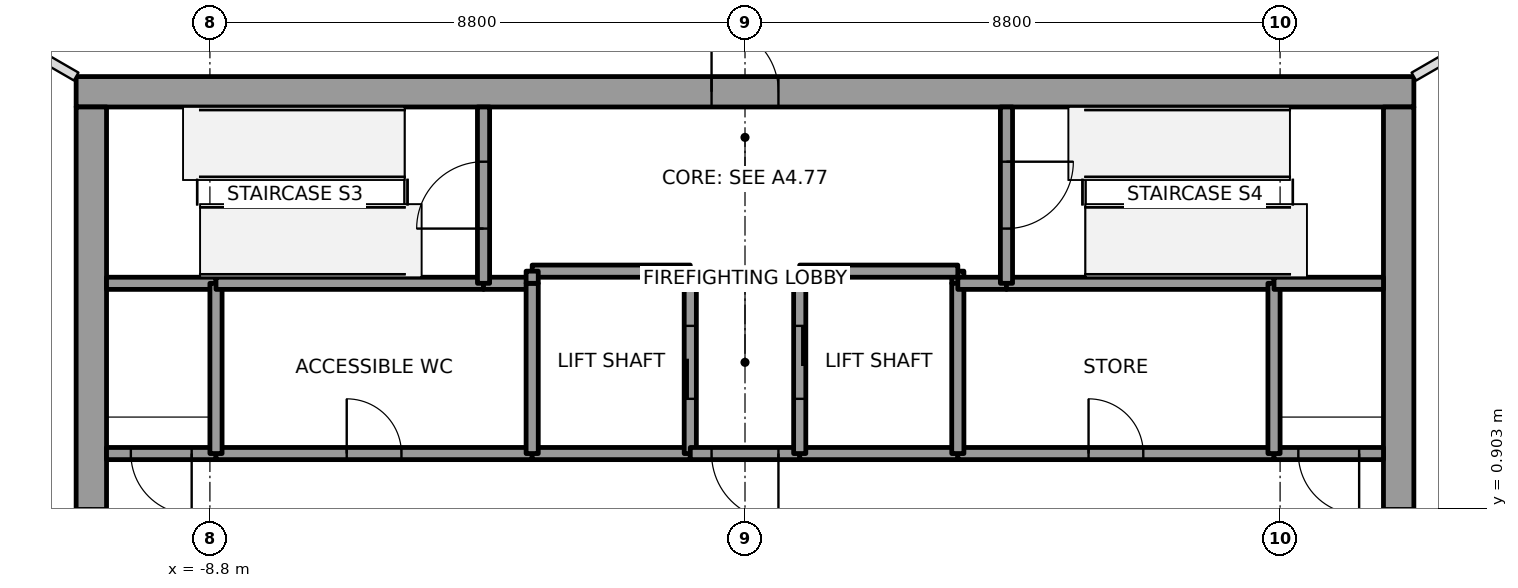
"""IFC4 building model, lengths in metres.
Left out: names, types, materials, properties, quantities, classifications, styles, units other than length and angle.
Written with IfcOpenShell. Run it as: python <this file> out.ifc"""

import sys

from ifc_helpers import new_model, si_unit, direction, frame, frame_2d, origin, place, context, subcontext, project, spatial, rectangle, extrude, element, fill, save


model = new_model("IFC4")
c1 = context("Model", 3, precision=1e-05, world=origin(), true_north=direction((0.0, 1.0)))
c2 = subcontext(c1, "Body", "Model", "MODEL_VIEW")
j1 = project(units=[si_unit("LENGTHUNIT", "METRE"), si_unit("PLANEANGLEUNIT", "RADIAN")], contexts=[c1])
p1 = place(None, origin())
s1 = spatial("IfcSite", under=j1, at=p1, CompositionType="ELEMENT")
p2 = place(p1, origin())
s2 = spatial("IfcBuilding", under=s1, at=p2, CompositionType="ELEMENT")
p3 = place(p2, frame((0.0, 0.0, 330.4)))
s3 = spatial("IfcBuildingStorey", under=s2, at=p3, CompositionType="ELEMENT", Elevation=330.4)
p4 = place(p3, frame((-11.0, 7.75, 0.0), z_axis=(0.0, 0.0, 1.0), x_axis=(1.0, 0.0, 0.0)))
e1 = element("IfcWall", 1, at=p4, inside=s3, PredefinedType="SHEAR", context=c2, shape_type="SweptSolid", body=[
    extrude(rectangle(XDim=22.0, YDim=0.5, at=frame_2d((11.0, 0.0))), origin(), (0.0, 0.0, 1.0), 9.0),
])
p5 = place(p4, frame((10.45, 0.0, 0.0)))
e2 = element("IfcOpeningElement", 2, at=p5, cuts=e1, PredefinedType="OPENING", context=c2, shape_type="SweptSolid", body=[
    extrude(rectangle(XDim=1.1, YDim=2.1, at=frame_2d((0.55, 1.05))), frame((0.0, 0.25, 0.0), z_axis=(0.0, -1.0, 0.0), x_axis=(1.0, 0.0, 0.0)), (0.0, 0.0, 1.0), 0.5),
])
p6 = place(p3, frame((-10.75, -7.5, 0.0), z_axis=(0.0, 0.0, 1.0), x_axis=(0.0, 1.0, 0.0)))
e3 = element("IfcWall", 3, at=p6, inside=s3, PredefinedType="SHEAR", context=c2, shape_type="SweptSolid", body=[
    extrude(rectangle(XDim=15.0, YDim=0.5, at=frame_2d((7.5, 0.0))), origin(), (0.0, 0.0, 1.0), 9.0),
])
p7 = place(p6, frame((6.6, 0.0, 0.0)))
e4 = element("IfcOpeningElement", 4, at=p7, cuts=e3, PredefinedType="OPENING", context=c2, shape_type="SweptSolid", body=[
    extrude(rectangle(XDim=1.8, YDim=2.1, at=frame_2d((0.9, 1.05))), frame((0.0, 0.25, 0.0), z_axis=(0.0, -1.0, 0.0), x_axis=(1.0, 0.0, 0.0)), (0.0, 0.0, 1.0), 0.5),
])
p8 = place(p3, frame((10.75, -7.5, 0.0), z_axis=(0.0, 0.0, 1.0), x_axis=(0.0, 1.0, 0.0)))
e5 = element("IfcWall", 5, at=p8, inside=s3, PredefinedType="SHEAR", context=c2, shape_type="SweptSolid", body=[
    extrude(rectangle(XDim=15.0, YDim=0.5, at=frame_2d((7.5, 0.0))), origin(), (0.0, 0.0, 1.0), 9.0),
])
p9 = place(p8, frame((6.6, 0.0, 0.0)))
e6 = element("IfcOpeningElement", 6, at=p9, cuts=e5, PredefinedType="OPENING", context=c2, shape_type="SweptSolid", body=[
    extrude(rectangle(XDim=1.8, YDim=2.1, at=frame_2d((0.9, 1.05))), frame((0.0, 0.25, 0.0), z_axis=(0.0, -1.0, 0.0), x_axis=(1.0, 0.0, 0.0)), (0.0, 0.0, 1.0), 0.5),
])
p10 = place(p3, frame((-8.7, 1.8, 0.0), z_axis=(0.0, 0.0, 1.0), x_axis=(-1.0, 0.0, 0.0)))
e7 = element("IfcWall", 7, at=p10, inside=s3, PredefinedType="SOLIDWALL", context=c2, shape_type="SweptSolid", body=[
    extrude(rectangle(XDim=1.8, YDim=0.2, at=frame_2d((0.9, 0.0))), origin(), (0.0, 0.0, 1.0), 8.85),
])
p11 = place(p10, frame((0.4, 0.0, 0.0)))
e8 = element("IfcOpeningElement", 8, at=p11, cuts=e7, PredefinedType="OPENING", context=c2, shape_type="SweptSolid", body=[
    extrude(rectangle(XDim=1.0, YDim=2.1, at=frame_2d((0.5, 1.05))), frame((0.0, 0.1, 0.0), z_axis=(0.0, -1.0, 0.0), x_axis=(1.0, 0.0, 0.0)), (0.0, 0.0, 1.0), 0.2),
])
p12 = place(p3, frame((-8.7, 4.6, 0.0), z_axis=(0.0, 0.0, 1.0), x_axis=(-1.0, 0.0, 0.0)))
e9 = element("IfcWall", 9, at=p12, inside=s3, PredefinedType="SOLIDWALL", context=c2, shape_type="SweptSolid", body=[
    extrude(rectangle(XDim=1.8, YDim=0.2, at=frame_2d((0.9, 0.0))), origin(), (0.0, 0.0, 1.0), 8.85),
])
p13 = place(p3, frame((-8.7, 1.8, 0.0), z_axis=(0.0, 0.0, 1.0), x_axis=(1.0, 0.0, 0.0)))
e10 = element("IfcWall", 10, at=p13, inside=s3, PredefinedType="SOLIDWALL", context=c2, shape_type="SweptSolid", body=[
    extrude(rectangle(XDim=5.2, YDim=0.2, at=frame_2d((2.6, 0.0))), origin(), (0.0, 0.0, 1.0), 8.85),
])
p14 = place(p13, frame((2.15, 0.0, 0.0)))
e11 = element("IfcOpeningElement", 11, at=p14, cuts=e10, PredefinedType="OPENING", context=c2, shape_type="SweptSolid", body=[
    extrude(rectangle(XDim=0.9, YDim=2.1, at=frame_2d((0.45, 1.05))), frame((0.0, 0.1, 0.0), z_axis=(0.0, -1.0, 0.0), x_axis=(1.0, 0.0, 0.0)), (0.0, 0.0, 1.0), 0.2),
])
p15 = place(p3, frame((-8.7, 4.6, 0.0), z_axis=(0.0, 0.0, 1.0), x_axis=(0.0, -1.0, 0.0)))
e12 = element("IfcWall", 12, at=p15, inside=s3, PredefinedType="SOLIDWALL", context=c2, shape_type="SweptSolid", body=[
    extrude(rectangle(XDim=2.8, YDim=0.2, at=frame_2d((1.4, 0.0))), origin(), (0.0, 0.0, 1.0), 8.85),
])
p16 = place(p3, frame((-4.3, 4.6, 0.0), z_axis=(0.0, 0.0, 1.0), x_axis=(-1.0, 0.0, 0.0)))
e13 = element("IfcWall", 13, at=p16, inside=s3, PredefinedType="SOLIDWALL", context=c2, shape_type="SweptSolid", body=[
    extrude(rectangle(XDim=4.4, YDim=0.2, at=frame_2d((2.2, 0.0))), origin(), (0.0, 0.0, 1.0), 8.85),
])
p17 = place(p3, frame((-3.5, 4.6, 0.0), z_axis=(0.0, 0.0, 1.0), x_axis=(-1.0, 0.0, 0.0)))
e14 = element("IfcWall", 14, at=p17, inside=s3, PredefinedType="SOLIDWALL", context=c2, shape_type="SweptSolid", body=[
    extrude(rectangle(XDim=0.8, YDim=0.2, at=frame_2d((0.4, 0.0))), origin(), (0.0, 0.0, 1.0), 8.85),
])
p18 = place(p3, frame((-4.3, 4.6, 0.0), z_axis=(0.0, 0.0, 1.0), x_axis=(0.0, 1.0, 0.0)))
e15 = element("IfcWall", 15, at=p18, inside=s3, PredefinedType="SOLIDWALL", context=c2, shape_type="SweptSolid", body=[
    extrude(rectangle(XDim=2.9, YDim=0.2, at=frame_2d((1.45, 0.0))), origin(), (0.0, 0.0, 1.0), 8.85),
])
p19 = place(p18, frame((0.9, 0.0, 0.0)))
e16 = element("IfcOpeningElement", 16, at=p19, cuts=e15, PredefinedType="OPENING", context=c2, shape_type="SweptSolid", body=[
    extrude(rectangle(XDim=1.1, YDim=2.1, at=frame_2d((0.55, 1.05))), frame((0.0, 0.1, 0.0), z_axis=(0.0, -1.0, 0.0), x_axis=(1.0, 0.0, 0.0)), (0.0, 0.0, 1.0), 0.2),
])
p20 = place(p3, frame((-0.9, 1.8, 0.0), z_axis=(0.0, 0.0, 1.0), x_axis=(-1.0, 0.0, 0.0)))
e17 = element("IfcWall", 17, at=p20, inside=s3, PredefinedType="SOLIDWALL", context=c2, shape_type="SweptSolid", body=[
    extrude(rectangle(XDim=2.6, YDim=0.2, at=frame_2d((1.3, 0.0))), origin(), (0.0, 0.0, 1.0), 8.85),
])
p21 = place(p3, frame((-3.5, 1.8, 0.0), z_axis=(0.0, 0.0, 1.0), x_axis=(0.0, 1.0, 0.0)))
e18 = element("IfcWall", 18, at=p21, inside=s3, PredefinedType="SOLIDWALL", context=c2, shape_type="SweptSolid", body=[
    extrude(rectangle(XDim=2.8, YDim=0.2, at=frame_2d((1.4, 0.0))), origin(), (0.0, 0.0, 1.0), 8.85),
])
p22 = place(p3, frame((-0.9, 1.8, 0.0), z_axis=(0.0, 0.0, 1.0), x_axis=(0.0, 1.0, 0.0)))
e19 = element("IfcWall", 19, at=p22, inside=s3, PredefinedType="SOLIDWALL", context=c2, shape_type="SweptSolid", body=[
    extrude(rectangle(XDim=3.0, YDim=0.2, at=frame_2d((1.5, 0.0))), origin(), (0.0, 0.0, 1.0), 8.85),
])
p23 = place(p22, frame((0.9, 0.0, 0.0)))
e20 = element("IfcOpeningElement", 20, at=p23, cuts=e19, PredefinedType="OPENING", context=c2, shape_type="SweptSolid", body=[
    extrude(rectangle(XDim=1.2, YDim=2.1, at=frame_2d((0.6, 1.05))), frame((0.0, 0.1, 0.0), z_axis=(0.0, -1.0, 0.0), x_axis=(1.0, 0.0, 0.0)), (0.0, 0.0, 1.0), 0.2),
])
p24 = place(p3, frame((-0.9, 4.8, 0.0), z_axis=(0.0, 0.0, 1.0), x_axis=(-1.0, 0.0, 0.0)))
e21 = element("IfcWall", 21, at=p24, inside=s3, PredefinedType="SOLIDWALL", context=c2, shape_type="SweptSolid", body=[
    extrude(rectangle(XDim=2.6, YDim=0.2, at=frame_2d((1.3, 0.0))), origin(), (0.0, 0.0, 1.0), 8.85),
])
p25 = place(p3, frame((-3.5, 4.8, 0.0), z_axis=(0.0, 0.0, 1.0), x_axis=(0.0, -1.0, 0.0)))
e22 = element("IfcWall", 22, at=p25, inside=s3, PredefinedType="SOLIDWALL", context=c2, shape_type="SweptSolid", body=[
    extrude(rectangle(XDim=0.2, YDim=0.2, at=frame_2d((0.1, 0.0))), origin(), (0.0, 0.0, 1.0), 8.85),
])
p26 = place(p3, frame((0.9, 1.8, 0.0), z_axis=(0.0, 0.0, 1.0), x_axis=(-1.0, 0.0, 0.0)))
e23 = element("IfcWall", 23, at=p26, inside=s3, PredefinedType="SOLIDWALL", context=c2, shape_type="SweptSolid", body=[
    extrude(rectangle(XDim=1.8, YDim=0.2, at=frame_2d((0.9, 0.0))), origin(), (0.0, 0.0, 1.0), 8.85),
])
p27 = place(p26, frame((0.35, 0.0, 0.0)))
e24 = element("IfcOpeningElement", 24, at=p27, cuts=e23, PredefinedType="OPENING", context=c2, shape_type="SweptSolid", body=[
    extrude(rectangle(XDim=1.1, YDim=2.1, at=frame_2d((0.55, 1.05))), frame((0.0, 0.1, 0.0), z_axis=(0.0, -1.0, 0.0), x_axis=(1.0, 0.0, 0.0)), (0.0, 0.0, 1.0), 0.2),
])
p28 = place(p3, frame((3.5, 1.8, 0.0), z_axis=(0.0, 0.0, 1.0), x_axis=(-1.0, 0.0, 0.0)))
e25 = element("IfcWall", 25, at=p28, inside=s3, PredefinedType="SOLIDWALL", context=c2, shape_type="SweptSolid", body=[
    extrude(rectangle(XDim=2.6, YDim=0.2, at=frame_2d((1.3, 0.0))), origin(), (0.0, 0.0, 1.0), 8.85),
])
p29 = place(p3, frame((3.5, 4.6, 0.0), z_axis=(0.0, 0.0, 1.0), x_axis=(0.0, 1.0, 0.0)))
e26 = element("IfcWall", 26, at=p29, inside=s3, PredefinedType="SOLIDWALL", context=c2, shape_type="SweptSolid", body=[
    extrude(rectangle(XDim=0.2, YDim=0.2, at=frame_2d((0.1, 0.0))), origin(), (0.0, 0.0, 1.0), 8.85),
])
p30 = place(p3, frame((3.5, 4.8, 0.0), z_axis=(0.0, 0.0, 1.0), x_axis=(-1.0, 0.0, 0.0)))
e27 = element("IfcWall", 27, at=p30, inside=s3, PredefinedType="SOLIDWALL", context=c2, shape_type="SweptSolid", body=[
    extrude(rectangle(XDim=2.6, YDim=0.2, at=frame_2d((1.3, 0.0))), origin(), (0.0, 0.0, 1.0), 8.85),
])
p31 = place(p3, frame((0.9, 4.8, 0.0), z_axis=(0.0, 0.0, 1.0), x_axis=(0.0, -1.0, 0.0)))
e28 = element("IfcWall", 28, at=p31, inside=s3, PredefinedType="SOLIDWALL", context=c2, shape_type="SweptSolid", body=[
    extrude(rectangle(XDim=3.0, YDim=0.2, at=frame_2d((1.5, 0.0))), origin(), (0.0, 0.0, 1.0), 8.85),
])
p32 = place(p31, frame((0.9, 0.0, 0.0)))
e29 = element("IfcOpeningElement", 29, at=p32, cuts=e28, PredefinedType="OPENING", context=c2, shape_type="SweptSolid", body=[
    extrude(rectangle(XDim=1.2, YDim=2.1, at=frame_2d((0.6, 1.05))), frame((0.0, 0.1, 0.0), z_axis=(0.0, -1.0, 0.0), x_axis=(1.0, 0.0, 0.0)), (0.0, 0.0, 1.0), 0.2),
])
p33 = place(p3, frame((3.5, 1.8, 0.0), z_axis=(0.0, 0.0, 1.0), x_axis=(1.0, 0.0, 0.0)))
e30 = element("IfcWall", 30, at=p33, inside=s3, PredefinedType="SOLIDWALL", context=c2, shape_type="SweptSolid", body=[
    extrude(rectangle(XDim=5.2, YDim=0.2, at=frame_2d((2.6, 0.0))), origin(), (0.0, 0.0, 1.0), 8.85),
])
p34 = place(p33, frame((2.15, 0.0, 0.0)))
e31 = element("IfcOpeningElement", 31, at=p34, cuts=e30, PredefinedType="OPENING", context=c2, shape_type="SweptSolid", body=[
    extrude(rectangle(XDim=0.9, YDim=2.1, at=frame_2d((0.45, 1.05))), frame((0.0, 0.1, 0.0), z_axis=(0.0, -1.0, 0.0), x_axis=(1.0, 0.0, 0.0)), (0.0, 0.0, 1.0), 0.2),
])
p35 = place(p3, frame((3.5, 4.6, 0.0), z_axis=(0.0, 0.0, 1.0), x_axis=(0.0, -1.0, 0.0)))
e32 = element("IfcWall", 32, at=p35, inside=s3, PredefinedType="SOLIDWALL", context=c2, shape_type="SweptSolid", body=[
    extrude(rectangle(XDim=2.8, YDim=0.2, at=frame_2d((1.4, 0.0))), origin(), (0.0, 0.0, 1.0), 8.85),
])
p36 = place(p3, frame((4.3, 4.6, 0.0), z_axis=(0.0, 0.0, 1.0), x_axis=(-1.0, 0.0, 0.0)))
e33 = element("IfcWall", 33, at=p36, inside=s3, PredefinedType="SOLIDWALL", context=c2, shape_type="SweptSolid", body=[
    extrude(rectangle(XDim=0.8, YDim=0.2, at=frame_2d((0.4, 0.0))), origin(), (0.0, 0.0, 1.0), 8.85),
])
p37 = place(p3, frame((8.7, 4.6, 0.0), z_axis=(0.0, 0.0, 1.0), x_axis=(-1.0, 0.0, 0.0)))
e34 = element("IfcWall", 34, at=p37, inside=s3, PredefinedType="SOLIDWALL", context=c2, shape_type="SweptSolid", body=[
    extrude(rectangle(XDim=4.4, YDim=0.2, at=frame_2d((2.2, 0.0))), origin(), (0.0, 0.0, 1.0), 8.85),
])
p38 = place(p3, frame((4.3, 7.5, 0.0), z_axis=(0.0, 0.0, 1.0), x_axis=(0.0, -1.0, 0.0)))
e35 = element("IfcWall", 35, at=p38, inside=s3, PredefinedType="SOLIDWALL", context=c2, shape_type="SweptSolid", body=[
    extrude(rectangle(XDim=2.9, YDim=0.2, at=frame_2d((1.45, 0.0))), origin(), (0.0, 0.0, 1.0), 8.85),
])
p39 = place(p38, frame((0.9, 0.0, 0.0)))
e36 = element("IfcOpeningElement", 36, at=p39, cuts=e35, PredefinedType="OPENING", context=c2, shape_type="SweptSolid", body=[
    extrude(rectangle(XDim=1.1, YDim=2.1, at=frame_2d((0.55, 1.05))), frame((0.0, 0.1, 0.0), z_axis=(0.0, -1.0, 0.0), x_axis=(1.0, 0.0, 0.0)), (0.0, 0.0, 1.0), 0.2),
])
p40 = place(p3, frame((10.5, 1.8, 0.0), z_axis=(0.0, 0.0, 1.0), x_axis=(-1.0, 0.0, 0.0)))
e37 = element("IfcWall", 37, at=p40, inside=s3, PredefinedType="SOLIDWALL", context=c2, shape_type="SweptSolid", body=[
    extrude(rectangle(XDim=1.8, YDim=0.2, at=frame_2d((0.9, 0.0))), origin(), (0.0, 0.0, 1.0), 8.85),
])
p41 = place(p40, frame((0.4, 0.0, 0.0)))
e38 = element("IfcOpeningElement", 38, at=p41, cuts=e37, PredefinedType="OPENING", context=c2, shape_type="SweptSolid", body=[
    extrude(rectangle(XDim=1.0, YDim=2.1, at=frame_2d((0.5, 1.05))), frame((0.0, 0.1, 0.0), z_axis=(0.0, -1.0, 0.0), x_axis=(1.0, 0.0, 0.0)), (0.0, 0.0, 1.0), 0.2),
])
p42 = place(p3, frame((8.7, 1.8, 0.0), z_axis=(0.0, 0.0, 1.0), x_axis=(0.0, 1.0, 0.0)))
e39 = element("IfcWall", 39, at=p42, inside=s3, PredefinedType="SOLIDWALL", context=c2, shape_type="SweptSolid", body=[
    extrude(rectangle(XDim=2.8, YDim=0.2, at=frame_2d((1.4, 0.0))), origin(), (0.0, 0.0, 1.0), 8.85),
])
p43 = place(p3, frame((10.5, 4.6, 0.0), z_axis=(0.0, 0.0, 1.0), x_axis=(-1.0, 0.0, 0.0)))
e40 = element("IfcWall", 40, at=p43, inside=s3, PredefinedType="SOLIDWALL", context=c2, shape_type="SweptSolid", body=[
    extrude(rectangle(XDim=1.8, YDim=0.2, at=frame_2d((0.9, 0.0))), origin(), (0.0, 0.0, 1.0), 8.85),
])
for number, where, z_axis, x_axis in (
    (41, (-11.0, 8.001, 0.0), (0.0, 0.0, 1.0), (-0.866, 0.5, 0.0)),
    (42, (11.0, 8.0, 0.0), (0.0, 0.0, 1.0), (0.866, 0.5, 0.0)),
):
    element("IfcWall", number, at=place(p3, frame(where, z_axis=z_axis, x_axis=x_axis)), inside=s3, PredefinedType="PARTITIONING", context=c2, shape_type="SweptSolid", body=[
        extrude(rectangle(XDim=6.686, YDim=0.15, at=frame_2d((3.343, 0.0))), origin(), (0.0, 0.0, 1.0), 8.083),
    ])
p44 = place(p23, origin())
e43 = element("IfcDoor", 43, at=p44, inside=s3, OperationType="SLIDING_TO_RIGHT", PredefinedType="DOOR", context=c2, shape_type="SweptSolid", body=[
    extrude(rectangle(XDim=1.2, YDim=2.1, at=frame_2d((0.6, 1.05))), frame((0.0, 0.025, 0.0), z_axis=(0.0, -1.0, 0.0), x_axis=(1.0, 0.0, 0.0)), (0.0, 0.0, 1.0), 0.05),
])
fill(e20, e43)
p45 = place(p32, origin())
e44 = element("IfcDoor", 44, at=p45, inside=s3, OperationType="SLIDING_TO_RIGHT", PredefinedType="DOOR", context=c2, shape_type="SweptSolid", body=[
    extrude(rectangle(XDim=1.2, YDim=2.1, at=frame_2d((0.6, 1.05))), frame((0.0, 0.025, 0.0), z_axis=(0.0, -1.0, 0.0), x_axis=(1.0, 0.0, 0.0)), (0.0, 0.0, 1.0), 0.05),
])
fill(e29, e44)
p46 = place(p27, origin())
e45 = element("IfcDoor", 45, at=p46, inside=s3, OperationType="SINGLE_SWING_RIGHT", PredefinedType="DOOR", context=c2, shape_type="SweptSolid", body=[
    extrude(rectangle(XDim=1.1, YDim=2.1, at=frame_2d((0.55, 1.05))), frame((0.0, 0.025, 0.0), z_axis=(0.0, -1.0, 0.0), x_axis=(1.0, 0.0, 0.0)), (0.0, 0.0, 1.0), 0.05),
])
fill(e24, e45)
p47 = place(p11, origin())
e46 = element("IfcDoor", 46, at=p47, inside=s3, OperationType="SINGLE_SWING_LEFT", PredefinedType="DOOR", context=c2, shape_type="SweptSolid", body=[
    extrude(rectangle(XDim=1.0, YDim=2.1, at=frame_2d((0.5, 1.05))), frame((0.0, 0.025, 0.0), z_axis=(0.0, -1.0, 0.0), x_axis=(1.0, 0.0, 0.0)), (0.0, 0.0, 1.0), 0.05),
])
fill(e8, e46)
p48 = place(p41, origin())
e47 = element("IfcDoor", 47, at=p48, inside=s3, OperationType="SINGLE_SWING_RIGHT", PredefinedType="DOOR", context=c2, shape_type="SweptSolid", body=[
    extrude(rectangle(XDim=1.0, YDim=2.1, at=frame_2d((0.5, 1.05))), frame((0.0, 0.025, 0.0), z_axis=(0.0, -1.0, 0.0), x_axis=(1.0, 0.0, 0.0)), (0.0, 0.0, 1.0), 0.05),
])
fill(e38, e47)
p49 = place(p19, origin())
e48 = element("IfcDoor", 48, at=p49, inside=s3, OperationType="SINGLE_SWING_RIGHT", PredefinedType="DOOR", context=c2, shape_type="SweptSolid", body=[
    extrude(rectangle(XDim=1.1, YDim=2.1, at=frame_2d((0.55, 1.05))), frame((0.0, 0.025, 0.0), z_axis=(0.0, -1.0, 0.0), x_axis=(1.0, 0.0, 0.0)), (0.0, 0.0, 1.0), 0.05),
])
fill(e16, e48)
p50 = place(p39, origin())
e49 = element("IfcDoor", 49, at=p50, inside=s3, OperationType="SINGLE_SWING_LEFT", PredefinedType="DOOR", context=c2, shape_type="SweptSolid", body=[
    extrude(rectangle(XDim=1.1, YDim=2.1, at=frame_2d((0.55, 1.05))), frame((0.0, 0.025, 0.0), z_axis=(0.0, -1.0, 0.0), x_axis=(1.0, 0.0, 0.0)), (0.0, 0.0, 1.0), 0.05),
])
fill(e36, e49)
p51 = place(p34, origin())
e50 = element("IfcDoor", 50, at=p51, inside=s3, OperationType="SINGLE_SWING_RIGHT", PredefinedType="DOOR", context=c2, shape_type="SweptSolid", body=[
    extrude(rectangle(XDim=0.9, YDim=2.1, at=frame_2d((0.45, 1.05))), frame((0.0, 0.025, 0.0), z_axis=(0.0, -1.0, 0.0), x_axis=(1.0, 0.0, 0.0)), (0.0, 0.0, 1.0), 0.05),
])
fill(e31, e50)
p52 = place(p14, origin())
e51 = element("IfcDoor", 51, at=p52, inside=s3, OperationType="SINGLE_SWING_LEFT", PredefinedType="DOOR", context=c2, shape_type="SweptSolid", body=[
    extrude(rectangle(XDim=0.9, YDim=2.1, at=frame_2d((0.45, 1.05))), frame((0.0, 0.025, 0.0), z_axis=(0.0, -1.0, 0.0), x_axis=(1.0, 0.0, 0.0)), (0.0, 0.0, 1.0), 0.05),
])
fill(e11, e51)
p53 = place(p7, origin())
e52 = element("IfcDoor", 52, at=p53, inside=s3, OperationType="DOUBLE_DOOR_SINGLE_SWING", PredefinedType="DOOR", context=c2, shape_type="SweptSolid", body=[
    extrude(rectangle(XDim=1.8, YDim=2.1, at=frame_2d((0.9, 1.05))), frame((0.0, 0.025, 0.0), z_axis=(0.0, -1.0, 0.0), x_axis=(1.0, 0.0, 0.0)), (0.0, 0.0, 1.0), 0.05),
])
fill(e4, e52)
p54 = place(p9, origin())
e53 = element("IfcDoor", 53, at=p54, inside=s3, OperationType="DOUBLE_DOOR_SINGLE_SWING", PredefinedType="DOOR", context=c2, shape_type="SweptSolid", body=[
    extrude(rectangle(XDim=1.8, YDim=2.1, at=frame_2d((0.9, 1.05))), frame((0.0, 0.025, 0.0), z_axis=(0.0, -1.0, 0.0), x_axis=(1.0, 0.0, 0.0)), (0.0, 0.0, 1.0), 0.05),
])
fill(e6, e53)
p55 = place(p5, origin())
e54 = element("IfcDoor", 54, at=p55, inside=s3, OperationType="SINGLE_SWING_LEFT", PredefinedType="DOOR", context=c2, shape_type="SweptSolid", body=[
    extrude(rectangle(XDim=1.1, YDim=2.1, at=frame_2d((0.55, 1.05))), frame((0.0, 0.025, 0.0), z_axis=(0.0, -1.0, 0.0), x_axis=(1.0, 0.0, 0.0)), (0.0, 0.0, 1.0), 0.05),
])
fill(e2, e54)
save(model, sys.argv[1])
